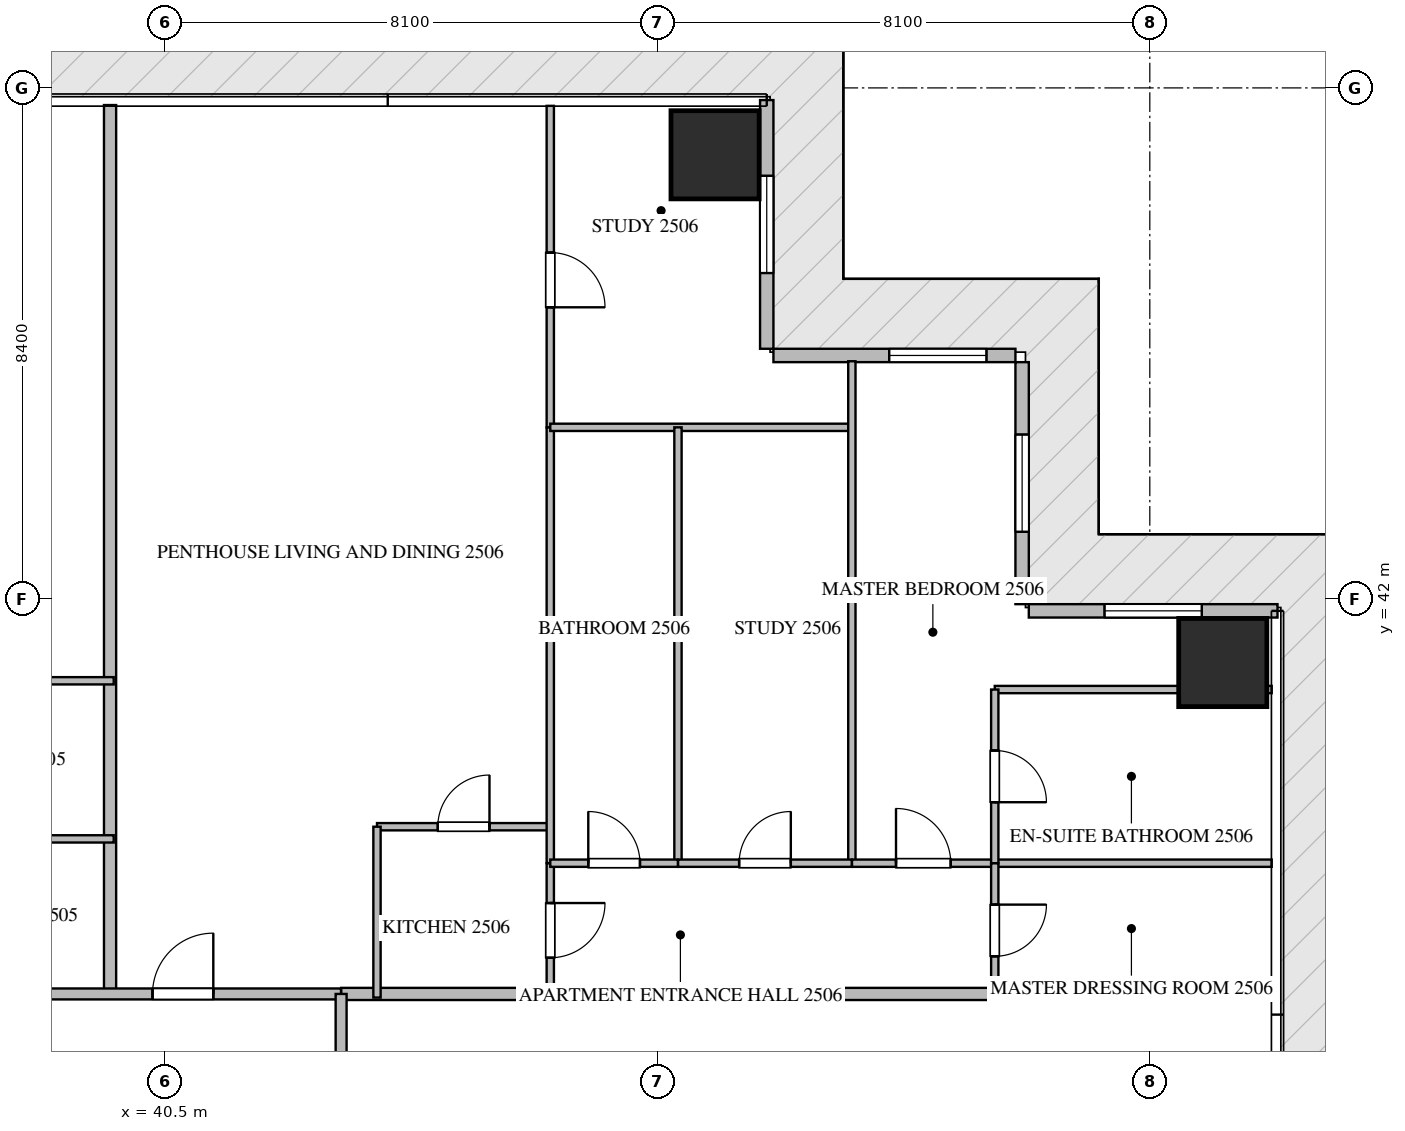
"""IFC4 building model, lengths in metres.
Left out: names, types, materials, properties, quantities, classifications, styles, units other than length and angle.
Written with IfcOpenShell. Run it as: python <this file> out.ifc"""

import sys

from ifc_helpers import new_model, si_unit, direction, frame, frame_2d, origin, origin_2d, place, context, subcontext, project, spatial, rectangle, extrude, source, transform, mapped, element, fill, save


model = new_model("IFC4")
c1 = context("Model", 3, precision=1e-05, world=origin(), true_north=direction((0.0, 1.0)))
c2 = subcontext(c1, "Body", "Model", "MODEL_VIEW")
j1 = project(units=[si_unit("LENGTHUNIT", "METRE"), si_unit("PLANEANGLEUNIT", "RADIAN")], contexts=[c1])
p1 = place(None, origin())
s1 = spatial("IfcSite", under=j1, at=p1, CompositionType="ELEMENT")
p2 = place(p1, origin())
s2 = spatial("IfcBuilding", under=s1, at=p2, CompositionType="ELEMENT")
p3 = place(p2, frame((0.0, 0.0, 101.7)))
s3 = spatial("IfcBuildingStorey", under=s2, at=p3, CompositionType="ELEMENT", Elevation=101.7)
m1 = source(origin(), c2, "Body", "SweptSolid", [
    extrude(rectangle(XDim=1.45, YDim=1.45, at=origin_2d()), origin(), (0.0, 0.0, 1.0), 3.75),
])
for number, where, z_axis, x_axis in (
    (1, (49.55, 49.3, -0.26), (0.0, 0.0, 1.0), (1.0, 0.0, 0.0)),
    (2, (57.9, 40.95, -0.26), (0.0, 0.0, 1.0), (1.0, 0.0, 0.0)),
):
    element("IfcColumn", number, at=place(p3, frame(where, z_axis=z_axis, x_axis=x_axis)), inside=s3, PredefinedType="COLUMN", context=c2, shape_type="MappedRepresentation", body=[
        mapped(m1, transform((0.0, 0.0, 0.0), scale=1.0)),
    ])
p4 = place(p3, frame((58.8, 41.8, 0.0), z_axis=(0.0, 0.0, 1.0), x_axis=(-1.0, 0.0, 0.0)))
e3 = element("IfcWall", 3, at=p4, inside=s3, PredefinedType="ELEMENTEDWALL", context=c2, shape_type="SweptSolid", body=[
    extrude(rectangle(XDim=4.09, YDim=0.22, at=frame_2d((2.045, 0.0))), origin(), (0.0, 0.0, 1.0), 3.475),
])
p5 = place(p4, frame((1.245, 0.0, 0.65)))
e4 = element("IfcOpeningElement", 4, at=p5, cuts=e3, PredefinedType="OPENING", context=c2, shape_type="SweptSolid", body=[
    extrude(rectangle(XDim=1.6, YDim=2.1, at=frame_2d((0.8, 1.05))), frame((0.0, 0.12, 0.0), z_axis=(0.0, -1.0, 0.0), x_axis=(1.0, 0.0, 0.0)), (0.0, 0.0, 1.0), 0.24),
])
p6 = place(p3, frame((54.6, 41.91, 0.0), z_axis=(0.0, 0.0, 1.0), x_axis=(0.0, 1.0, 0.0)))
e5 = element("IfcWall", 5, at=p6, inside=s3, PredefinedType="ELEMENTEDWALL", context=c2, shape_type="SweptSolid", body=[
    extrude(rectangle(XDim=3.98, YDim=0.22, at=frame_2d((1.99, 0.0))), origin(), (0.0, 0.0, 1.0), 3.475),
])
p7 = place(p6, frame((1.19, 0.0, 0.65)))
e6 = element("IfcOpeningElement", 6, at=p7, cuts=e5, PredefinedType="OPENING", context=c2, shape_type="SweptSolid", body=[
    extrude(rectangle(XDim=1.6, YDim=2.1, at=frame_2d((0.8, 1.05))), frame((0.0, 0.12, 0.0), z_axis=(0.0, -1.0, 0.0), x_axis=(1.0, 0.0, 0.0)), (0.0, 0.0, 1.0), 0.24),
])
p8 = place(p3, frame((54.49, 46.0, 0.0), z_axis=(0.0, 0.0, 1.0), x_axis=(-1.0, 0.0, 0.0)))
e7 = element("IfcWall", 7, at=p8, inside=s3, PredefinedType="ELEMENTEDWALL", context=c2, shape_type="SweptSolid", body=[
    extrude(rectangle(XDim=3.98, YDim=0.22, at=frame_2d((1.99, 0.0))), origin(), (0.0, 0.0, 1.0), 3.475),
])
p9 = place(p8, frame((0.476, 0.0, 0.65)))
e8 = element("IfcOpeningElement", 8, at=p9, cuts=e7, PredefinedType="OPENING", context=c2, shape_type="SweptSolid", body=[
    extrude(rectangle(XDim=1.6, YDim=2.1, at=frame_2d((0.8, 1.05))), frame((0.0, 0.12, 0.0), z_axis=(0.0, -1.0, 0.0), x_axis=(1.0, 0.0, 0.0)), (0.0, 0.0, 1.0), 0.24),
])
p10 = place(p3, frame((50.4, 46.11, 0.0), z_axis=(0.0, 0.0, 1.0), x_axis=(0.0, 1.0, 0.0)))
e9 = element("IfcWall", 9, at=p10, inside=s3, PredefinedType="ELEMENTEDWALL", context=c2, shape_type="SweptSolid", body=[
    extrude(rectangle(XDim=4.09, YDim=0.22, at=frame_2d((2.045, 0.0))), origin(), (0.0, 0.0, 1.0), 3.475),
])
p11 = place(p10, frame((1.245, 0.0, 0.65)))
e10 = element("IfcOpeningElement", 10, at=p11, cuts=e9, PredefinedType="OPENING", context=c2, shape_type="SweptSolid", body=[
    extrude(rectangle(XDim=1.6, YDim=2.1, at=frame_2d((0.8, 1.05))), frame((0.0, 0.12, 0.0), z_axis=(0.0, -1.0, 0.0), x_axis=(1.0, 0.0, 0.0)), (0.0, 0.0, 1.0), 0.24),
])
p12 = place(p3, frame((39.6, 35.5, 0.0), z_axis=(0.0, 0.0, 1.0), x_axis=(0.0, 1.0, 0.0)))
e11 = element("IfcWall", 11, at=p12, inside=s3, PredefinedType="PARTITIONING", context=c2, shape_type="SweptSolid", body=[
    extrude(rectangle(XDim=14.618, YDim=0.2, at=frame_2d((7.309, 0.0))), origin(), (0.0, 0.0, 1.0), 3.49),
])
p13 = place(p3, frame((43.4, 35.5, 0.0), z_axis=(0.0, 0.0, 1.0), x_axis=(1.0, 0.0, 0.0)))
e12 = element("IfcWall", 12, at=p13, inside=s3, PredefinedType="PARTITIONING", context=c2, shape_type="SweptSolid", body=[
    extrude(rectangle(XDim=15.318, YDim=0.2, at=frame_2d((7.659, 0.0))), origin(), (0.0, 0.0, 1.0), 3.49),
])
p14 = place(p3, frame((21.402, 35.5, 0.0), z_axis=(0.0, 0.0, 1.0), x_axis=(1.0, 0.0, 0.0)))
e13 = element("IfcWall", 13, at=p14, inside=s3, PredefinedType="PARTITIONING", context=c2, shape_type="SweptSolid", body=[
    extrude(rectangle(XDim=21.996, YDim=0.18, at=frame_2d((10.998, 0.0))), origin(), (0.0, 0.0, 1.0), 3.49),
])
p15 = place(p14, frame((1.96, 0.0, 0.0)))
e14 = element("IfcOpeningElement", 14, at=p15, cuts=e13, PredefinedType="OPENING", context=c2, shape_type="SweptSolid", body=[
    extrude(rectangle(XDim=1.0, YDim=2.15, at=frame_2d((0.5, 1.075))), frame((0.0, 0.1, 0.0), z_axis=(0.0, -1.0, 0.0), x_axis=(1.0, 0.0, 0.0)), (0.0, 0.0, 1.0), 0.2),
])
p16 = place(p14, frame((5.249, 0.0, 0.0)))
e15 = element("IfcOpeningElement", 15, at=p16, cuts=e13, PredefinedType="OPENING", context=c2, shape_type="SweptSolid", body=[
    extrude(rectangle(XDim=1.0, YDim=2.15, at=frame_2d((0.5, 1.075))), frame((0.0, 0.1, 0.0), z_axis=(0.0, -1.0, 0.0), x_axis=(1.0, 0.0, 0.0)), (0.0, 0.0, 1.0), 0.2),
])
p17 = place(p14, frame((11.653, 0.0, 0.0)))
e16 = element("IfcOpeningElement", 16, at=p17, cuts=e13, PredefinedType="OPENING", context=c2, shape_type="SweptSolid", body=[
    extrude(rectangle(XDim=1.0, YDim=2.15, at=frame_2d((0.5, 1.075))), frame((0.0, 0.1, 0.0), z_axis=(0.0, -1.0, 0.0), x_axis=(1.0, 0.0, 0.0)), (0.0, 0.0, 1.0), 0.2),
])
p18 = place(p14, frame((18.896, 0.0, 0.0)))
e17 = element("IfcOpeningElement", 17, at=p18, cuts=e13, PredefinedType="OPENING", context=c2, shape_type="SweptSolid", body=[
    extrude(rectangle(XDim=1.0, YDim=2.15, at=frame_2d((0.5, 1.075))), frame((0.0, 0.1, 0.0), z_axis=(0.0, -1.0, 0.0), x_axis=(1.0, 0.0, 0.0)), (0.0, 0.0, 1.0), 0.2),
])
p19 = place(p3, frame((43.4, 14.9, 0.0), z_axis=(0.0, 0.0, 1.0), x_axis=(0.0, 1.0, 0.0)))
e18 = element("IfcWall", 18, at=p19, inside=s3, PredefinedType="PARTITIONING", context=c2, shape_type="SweptSolid", body=[
    extrude(rectangle(XDim=20.6, YDim=0.18, at=frame_2d((10.3, 0.0))), origin(), (0.0, 0.0, 1.0), 3.49),
])
p20 = place(p19, frame((3.43, 0.0, 0.0)))
e19 = element("IfcOpeningElement", 19, at=p20, cuts=e18, PredefinedType="OPENING", context=c2, shape_type="SweptSolid", body=[
    extrude(rectangle(XDim=1.0, YDim=2.15, at=frame_2d((0.5, 1.075))), frame((0.0, 0.1, 0.0), z_axis=(0.0, -1.0, 0.0), x_axis=(1.0, 0.0, 0.0)), (0.0, 0.0, 1.0), 0.2),
])
p21 = place(p19, frame((17.64, 0.0, 0.0)))
e20 = element("IfcOpeningElement", 20, at=p21, cuts=e18, PredefinedType="OPENING", context=c2, shape_type="SweptSolid", body=[
    extrude(rectangle(XDim=1.0, YDim=2.15, at=frame_2d((0.5, 1.075))), frame((0.0, 0.1, 0.0), z_axis=(0.0, -1.0, 0.0), x_axis=(1.0, 0.0, 0.0)), (0.0, 0.0, 1.0), 0.2),
])
for number, where, z_axis, x_axis in (
    (21, (35.3, 38.05, 0.0), (0.0, 0.0, 1.0), (1.0, 0.0, 0.0)),
    (22, (35.3, 40.65, 0.0), (0.0, 0.0, 1.0), (1.0, 0.0, 0.0)),
):
    element("IfcWall", number, at=place(p3, frame(where, z_axis=z_axis, x_axis=x_axis)), inside=s3, PredefinedType="PARTITIONING", context=c2, shape_type="SweptSolid", body=[
        extrude(rectangle(XDim=4.36, YDim=0.12, at=frame_2d((2.18, 0.0))), origin(), (0.0, 0.0, 1.0), 3.49),
    ])
p22 = place(p3, frame((43.99, 38.25, 0.0), z_axis=(0.0, 0.0, 1.0), x_axis=(1.0, 0.0, 0.0)))
e23 = element("IfcWall", 23, at=p22, inside=s3, PredefinedType="PARTITIONING", context=c2, shape_type="SweptSolid", body=[
    extrude(rectangle(XDim=2.85, YDim=0.12, at=frame_2d((1.425, 0.0))), origin(), (0.0, 0.0, 1.0), 3.49),
])
p23 = place(p22, frame((1.0, 0.0, 0.0)))
e24 = element("IfcOpeningElement", 24, at=p23, cuts=e23, PredefinedType="OPENING", context=c2, shape_type="SweptSolid", body=[
    extrude(rectangle(XDim=0.85, YDim=2.1, at=frame_2d((0.425, 1.05))), frame((0.0, 0.07, 0.0), z_axis=(0.0, -1.0, 0.0), x_axis=(1.0, 0.0, 0.0)), (0.0, 0.0, 1.0), 0.14),
])
p24 = place(p3, frame((43.99, 38.25, 0.0), z_axis=(0.0, 0.0, 1.0), x_axis=(0.0, -1.0, 0.0)))
e25 = element("IfcWall", 25, at=p24, inside=s3, PredefinedType="PARTITIONING", context=c2, shape_type="SweptSolid", body=[
    extrude(rectangle(XDim=2.81, YDim=0.12, at=frame_2d((1.405, 0.0))), origin(), (0.0, 0.0, 1.0), 3.49),
])
p25 = place(p3, frame((46.84, 37.65, 0.0), z_axis=(0.0, 0.0, 1.0), x_axis=(0.0, -1.0, 0.0)))
e26 = element("IfcWall", 26, at=p25, inside=s3, PredefinedType="PARTITIONING", context=c2, shape_type="SweptSolid", body=[
    extrude(rectangle(XDim=2.21, YDim=0.12, at=frame_2d((1.105, 0.0))), origin(), (0.0, 0.0, 1.0), 3.49),
])
p26 = place(p25, frame((0.655, 0.0, 0.0)))
e27 = element("IfcOpeningElement", 27, at=p26, cuts=e26, PredefinedType="OPENING", context=c2, shape_type="SweptSolid", body=[
    extrude(rectangle(XDim=0.9, YDim=2.1, at=frame_2d((0.45, 1.05))), frame((0.0, 0.07, 0.0), z_axis=(0.0, -1.0, 0.0), x_axis=(1.0, 0.0, 0.0)), (0.0, 0.0, 1.0), 0.14),
])
p27 = place(p3, frame((46.84, 50.105, 0.0), z_axis=(0.0, 0.0, 1.0), x_axis=(0.0, -1.0, 0.0)))
e28 = element("IfcWall", 28, at=p27, inside=s3, PredefinedType="PARTITIONING", context=c2, shape_type="SweptSolid", body=[
    extrude(rectangle(XDim=5.287, YDim=0.12, at=frame_2d((2.644, 0.0))), origin(), (0.0, 0.0, 1.0), 3.49),
])
p28 = place(p27, frame((2.413, 0.0, 0.0)))
e29 = element("IfcOpeningElement", 29, at=p28, cuts=e28, PredefinedType="OPENING", context=c2, shape_type="SweptSolid", body=[
    extrude(rectangle(XDim=0.9, YDim=2.1, at=frame_2d((0.45, 1.05))), frame((0.0, 0.07, 0.0), z_axis=(0.0, -1.0, 0.0), x_axis=(1.0, 0.0, 0.0)), (0.0, 0.0, 1.0), 0.14),
])
p29 = place(p3, frame((46.84, 44.816, 0.0), z_axis=(0.0, 0.0, 1.0), x_axis=(0.0, -1.0, 0.0)))
e30 = element("IfcWall", 30, at=p29, inside=s3, PredefinedType="PARTITIONING", context=c2, shape_type="SweptSolid", body=[
    extrude(rectangle(XDim=7.164, YDim=0.12, at=frame_2d((3.582, 0.0))), origin(), (0.0, 0.0, 1.0), 3.49),
])
p30 = place(p3, frame((46.84, 44.818, 0.0), z_axis=(0.0, 0.0, 1.0), x_axis=(1.0, 0.0, 0.0)))
e31 = element("IfcWall", 31, at=p30, inside=s3, PredefinedType="PARTITIONING", context=c2, shape_type="SweptSolid", body=[
    extrude(rectangle(XDim=4.96, YDim=0.12, at=frame_2d((2.48, 0.0))), origin(), (0.0, 0.0, 1.0), 3.49),
])
p31 = place(p3, frame((51.8, 45.905, 0.0), z_axis=(0.0, 0.0, 1.0), x_axis=(0.0, -1.0, 0.0)))
e32 = element("IfcWall", 32, at=p31, inside=s3, PredefinedType="PARTITIONING", context=c2, shape_type="SweptSolid", body=[
    extrude(rectangle(XDim=8.255, YDim=0.12, at=frame_2d((4.127, 0.0))), origin(), (0.0, 0.0, 1.0), 3.49),
])
p32 = place(p3, frame((48.94, 44.818, 0.0), z_axis=(0.0, 0.0, 1.0), x_axis=(0.0, -1.0, 0.0)))
e33 = element("IfcWall", 33, at=p32, inside=s3, PredefinedType="PARTITIONING", context=c2, shape_type="SweptSolid", body=[
    extrude(rectangle(XDim=7.168, YDim=0.12, at=frame_2d((3.584, 0.0))), origin(), (0.0, 0.0, 1.0), 3.49),
])
p33 = place(p3, frame((46.84, 37.65, 0.0), z_axis=(0.0, 0.0, 1.0), x_axis=(1.0, 0.0, 0.0)))
e34 = element("IfcWall", 34, at=p33, inside=s3, PredefinedType="PARTITIONING", context=c2, shape_type="SweptSolid", body=[
    extrude(rectangle(XDim=2.1, YDim=0.12, at=frame_2d((1.05, 0.0))), origin(), (0.0, 0.0, 1.0), 3.49),
])
p34 = place(p33, frame((0.625, 0.0, 0.0)))
e35 = element("IfcOpeningElement", 35, at=p34, cuts=e34, PredefinedType="OPENING", context=c2, shape_type="SweptSolid", body=[
    extrude(rectangle(XDim=0.85, YDim=2.1, at=frame_2d((0.425, 1.05))), frame((0.0, 0.07, 0.0), z_axis=(0.0, -1.0, 0.0), x_axis=(1.0, 0.0, 0.0)), (0.0, 0.0, 1.0), 0.14),
])
p35 = place(p3, frame((48.942, 37.65, 0.0), z_axis=(0.0, 0.0, 1.0), x_axis=(1.0, 0.0, 0.0)))
e36 = element("IfcWall", 36, at=p35, inside=s3, PredefinedType="PARTITIONING", context=c2, shape_type="SweptSolid", body=[
    extrude(rectangle(XDim=2.858, YDim=0.12, at=frame_2d((1.429, 0.0))), origin(), (0.0, 0.0, 1.0), 3.49),
])
p36 = place(p35, frame((1.004, 0.0, 0.0)))
e37 = element("IfcOpeningElement", 37, at=p36, cuts=e36, PredefinedType="OPENING", context=c2, shape_type="SweptSolid", body=[
    extrude(rectangle(XDim=0.85, YDim=2.1, at=frame_2d((0.425, 1.05))), frame((0.0, 0.07, 0.0), z_axis=(0.0, -1.0, 0.0), x_axis=(1.0, 0.0, 0.0)), (0.0, 0.0, 1.0), 0.14),
])
p37 = place(p3, frame((51.802, 37.65, 0.0), z_axis=(0.0, 0.0, 1.0), x_axis=(1.0, 0.0, 0.0)))
e38 = element("IfcWall", 38, at=p37, inside=s3, PredefinedType="PARTITIONING", context=c2, shape_type="SweptSolid", body=[
    extrude(rectangle(XDim=2.348, YDim=0.12, at=frame_2d((1.174, 0.0))), origin(), (0.0, 0.0, 1.0), 3.49),
])
p38 = place(p37, frame((0.724, 0.0, 0.0)))
e39 = element("IfcOpeningElement", 39, at=p38, cuts=e38, PredefinedType="OPENING", context=c2, shape_type="SweptSolid", body=[
    extrude(rectangle(XDim=0.9, YDim=2.1, at=frame_2d((0.45, 1.05))), frame((0.0, 0.07, 0.0), z_axis=(0.0, -1.0, 0.0), x_axis=(1.0, 0.0, 0.0)), (0.0, 0.0, 1.0), 0.14),
])
p39 = place(p3, frame((54.15, 40.506, 0.0), z_axis=(0.0, 0.0, 1.0), x_axis=(1.0, 0.0, 0.0)))
e40 = element("IfcWall", 40, at=p39, inside=s3, PredefinedType="PARTITIONING", context=c2, shape_type="SweptSolid", body=[
    extrude(rectangle(XDim=4.555, YDim=0.12, at=frame_2d((2.278, 0.0))), origin(), (0.0, 0.0, 1.0), 3.49),
])
p40 = place(p3, frame((54.152, 37.65, 0.0), z_axis=(0.0, 0.0, 1.0), x_axis=(1.0, 0.0, 0.0)))
e41 = element("IfcWall", 41, at=p40, inside=s3, PredefinedType="PARTITIONING", context=c2, shape_type="SweptSolid", body=[
    extrude(rectangle(XDim=4.553, YDim=0.12, at=frame_2d((2.276, 0.0))), origin(), (0.0, 0.0, 1.0), 3.49),
])
p41 = place(p3, frame((54.15, 40.506, 0.0), z_axis=(0.0, 0.0, 1.0), x_axis=(0.0, -1.0, 0.0)))
e42 = element("IfcWall", 42, at=p41, inside=s3, PredefinedType="PARTITIONING", context=c2, shape_type="SweptSolid", body=[
    extrude(rectangle(XDim=2.856, YDim=0.12, at=frame_2d((1.428, 0.0))), origin(), (0.0, 0.0, 1.0), 3.49),
])
p42 = place(p41, frame((1.003, 0.0, 0.0)))
e43 = element("IfcOpeningElement", 43, at=p42, cuts=e42, PredefinedType="OPENING", context=c2, shape_type="SweptSolid", body=[
    extrude(rectangle(XDim=0.85, YDim=2.1, at=frame_2d((0.425, 1.05))), frame((0.0, 0.07, 0.0), z_axis=(0.0, -1.0, 0.0), x_axis=(1.0, 0.0, 0.0)), (0.0, 0.0, 1.0), 0.14),
])
p43 = place(p3, frame((54.15, 37.648, 0.0), z_axis=(0.0, 0.0, 1.0), x_axis=(0.0, -1.0, 0.0)))
e44 = element("IfcWall", 44, at=p43, inside=s3, PredefinedType="PARTITIONING", context=c2, shape_type="SweptSolid", body=[
    extrude(rectangle(XDim=2.208, YDim=0.12, at=frame_2d((1.104, 0.0))), origin(), (0.0, 0.0, 1.0), 3.49),
])
p44 = place(p43, frame((0.679, 0.0, 0.0)))
e45 = element("IfcOpeningElement", 45, at=p44, cuts=e44, PredefinedType="OPENING", context=c2, shape_type="SweptSolid", body=[
    extrude(rectangle(XDim=0.85, YDim=2.1, at=frame_2d((0.425, 1.05))), frame((0.0, 0.07, 0.0), z_axis=(0.0, -1.0, 0.0), x_axis=(1.0, 0.0, 0.0)), (0.0, 0.0, 1.0), 0.14),
])
m2 = source(origin(), c2, "Body", "SweptSolid", [
    extrude(rectangle(XDim=1.6, YDim=2.1, at=frame_2d((0.8, 1.05))), frame((0.0, 0.03, 0.0), z_axis=(0.0, -1.0, 0.0), x_axis=(1.0, 0.0, 0.0)), (0.0, 0.0, 1.0), 0.06),
])
p45 = place(p5, origin())
e46 = element("IfcWindow", 46, at=p45, inside=s3, PartitioningType="SINGLE_PANEL", PredefinedType="WINDOW", context=c2, shape_type="MappedRepresentation", body=[
    mapped(m2, transform((0.0, 0.0, 0.0), scale=1.0)),
])
fill(e4, e46)
p46 = place(p7, origin())
e47 = element("IfcWindow", 47, at=p46, inside=s3, PartitioningType="SINGLE_PANEL", PredefinedType="WINDOW", context=c2, shape_type="MappedRepresentation", body=[
    mapped(m2, transform((0.0, 0.0, 0.0), scale=1.0)),
])
fill(e6, e47)
p47 = place(p9, origin())
e48 = element("IfcWindow", 48, at=p47, inside=s3, PartitioningType="SINGLE_PANEL", PredefinedType="WINDOW", context=c2, shape_type="MappedRepresentation", body=[
    mapped(m2, transform((0.0, 0.0, 0.0), scale=1.0)),
])
fill(e8, e48)
p48 = place(p11, origin())
e49 = element("IfcWindow", 49, at=p48, inside=s3, PartitioningType="SINGLE_PANEL", PredefinedType="WINDOW", context=c2, shape_type="MappedRepresentation", body=[
    mapped(m2, transform((0.0, 0.0, 0.0), scale=1.0)),
])
fill(e10, e49)
m3 = source(origin(), c2, "Body", "SweptSolid", [
    extrude(rectangle(XDim=1.0, YDim=2.15, at=frame_2d((0.5, 1.075))), frame((0.0, 0.025, 0.0), z_axis=(0.0, -1.0, 0.0), x_axis=(1.0, 0.0, 0.0)), (0.0, 0.0, 1.0), 0.05),
])
p49 = place(p18, origin())
e50 = element("IfcDoor", 50, at=p49, inside=s3, OperationType="SINGLE_SWING_RIGHT", PredefinedType="DOOR", context=c2, shape_type="MappedRepresentation", body=[
    mapped(m3, transform((0.0, 0.0, 0.0), scale=1.0)),
])
fill(e17, e50)
m4 = source(origin(), c2, "Body", "SweptSolid", [
    extrude(rectangle(XDim=0.85, YDim=2.1, at=frame_2d((0.425, 1.05))), frame((0.0, 0.025, 0.0), z_axis=(0.0, -1.0, 0.0), x_axis=(1.0, 0.0, 0.0)), (0.0, 0.0, 1.0), 0.05),
])
p50 = place(p23, origin())
e51 = element("IfcDoor", 51, at=p50, inside=s3, OperationType="SINGLE_SWING_RIGHT", PredefinedType="DOOR", context=c2, shape_type="MappedRepresentation", body=[
    mapped(m4, transform((0.0, 0.0, 0.0), scale=1.0)),
])
fill(e24, e51)
m5 = source(origin(), c2, "Body", "SweptSolid", [
    extrude(rectangle(XDim=0.9, YDim=2.1, at=frame_2d((0.45, 1.05))), frame((0.0, 0.025, 0.0), z_axis=(0.0, -1.0, 0.0), x_axis=(1.0, 0.0, 0.0)), (0.0, 0.0, 1.0), 0.05),
])
p51 = place(p26, origin())
e52 = element("IfcDoor", 52, at=p51, inside=s3, OperationType="SINGLE_SWING_LEFT", PredefinedType="DOOR", context=c2, shape_type="MappedRepresentation", body=[
    mapped(m5, transform((0.0, 0.0, 0.0), scale=1.0)),
])
fill(e27, e52)
p52 = place(p28, origin())
e53 = element("IfcDoor", 53, at=p52, inside=s3, OperationType="SINGLE_SWING_RIGHT", PredefinedType="DOOR", context=c2, shape_type="MappedRepresentation", body=[
    mapped(m5, transform((0.0, 0.0, 0.0), scale=1.0)),
])
fill(e29, e53)
p53 = place(p34, origin())
e54 = element("IfcDoor", 54, at=p53, inside=s3, OperationType="SINGLE_SWING_LEFT", PredefinedType="DOOR", context=c2, shape_type="MappedRepresentation", body=[
    mapped(m4, transform((0.0, 0.0, 0.0), scale=1.0)),
])
fill(e35, e54)
p54 = place(p36, origin())
e55 = element("IfcDoor", 55, at=p54, inside=s3, OperationType="SINGLE_SWING_RIGHT", PredefinedType="DOOR", context=c2, shape_type="MappedRepresentation", body=[
    mapped(m4, transform((0.0, 0.0, 0.0), scale=1.0)),
])
fill(e37, e55)
p55 = place(p38, origin())
e56 = element("IfcDoor", 56, at=p55, inside=s3, OperationType="SINGLE_SWING_LEFT", PredefinedType="DOOR", context=c2, shape_type="MappedRepresentation", body=[
    mapped(m5, transform((0.0, 0.0, 0.0), scale=1.0)),
])
fill(e39, e56)
p56 = place(p42, origin())
e57 = element("IfcDoor", 57, at=p56, inside=s3, OperationType="SINGLE_SWING_RIGHT", PredefinedType="DOOR", context=c2, shape_type="MappedRepresentation", body=[
    mapped(m4, transform((0.0, 0.0, 0.0), scale=1.0)),
])
fill(e43, e57)
p57 = place(p44, origin())
e58 = element("IfcDoor", 58, at=p57, inside=s3, OperationType="SINGLE_SWING_LEFT", PredefinedType="DOOR", context=c2, shape_type="MappedRepresentation", body=[
    mapped(m4, transform((0.0, 0.0, 0.0), scale=1.0)),
])
fill(e45, e58)
save(model, sys.argv[1])
